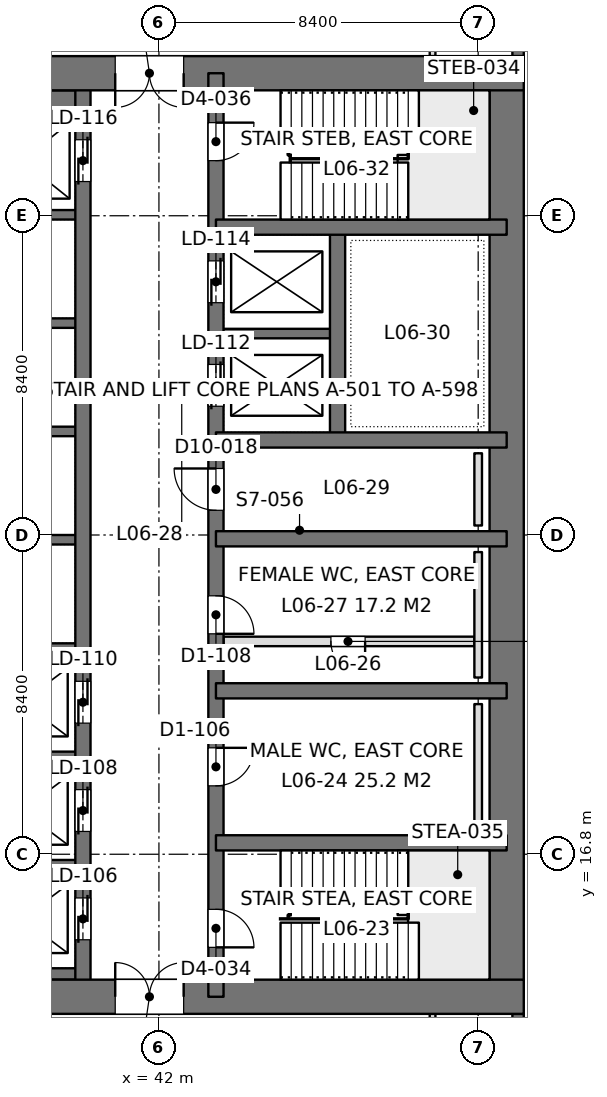
"""IFC4 building model, lengths in metres.
Left out: names, types, materials, properties, quantities, classifications, styles, units other than length and angle.
Written with IfcOpenShell. Run it as: python <this file> out.ifc"""

import sys

from ifc_helpers import new_model, si_unit, direction, frame, frame_2d, origin, place, context, subcontext, project, spatial, rectangle, extrude, element, fill, save


model = new_model("IFC4")
c1 = context("Model", 3, precision=1e-05, world=origin(), true_north=direction((0.0, 1.0)))
c2 = subcontext(c1, "Body", "Model", "MODEL_VIEW")
j1 = project(units=[si_unit("LENGTHUNIT", "METRE"), si_unit("PLANEANGLEUNIT", "RADIAN")], contexts=[c1])
p1 = place(None, origin())
s1 = spatial("IfcSite", under=j1, at=p1, CompositionType="ELEMENT")
p2 = place(p1, origin())
s2 = spatial("IfcBuilding", under=s1, at=p2, CompositionType="ELEMENT")
p3 = place(p2, frame((0.0, 0.0, 27.9)))
s3 = spatial("IfcBuildingStorey", under=s2, at=p3, CompositionType="ELEMENT", Elevation=27.9)
p4 = place(p3, frame((33.6, 13.05, 0.0), z_axis=(0.0, 0.0, 1.0), x_axis=(1.0, 0.0, 0.0)))
e1 = element("IfcWall", 1, at=p4, inside=s3, PredefinedType="SHEAR", context=c2, shape_type="SweptSolid", body=[
    extrude(rectangle(XDim=18.0, YDim=0.9, at=frame_2d((9.0, 0.0))), origin(), (0.0, 0.0, 1.0), 4.5),
])
p5 = place(p4, frame((7.25, 0.0, 0.0)))
e2 = element("IfcOpeningElement", 2, at=p5, cuts=e1, PredefinedType="OPENING", context=c2, shape_type="SweptSolid", body=[
    extrude(rectangle(XDim=1.8, YDim=2.4, at=frame_2d((0.9, 1.2))), frame((0.0, 0.46, 0.0), z_axis=(0.0, -1.0, 0.0), x_axis=(1.0, 0.0, 0.0)), (0.0, 0.0, 1.0), 0.92),
])
p6 = place(p3, frame((33.6, 37.35, 0.0), z_axis=(0.0, 0.0, 1.0), x_axis=(1.0, 0.0, 0.0)))
e3 = element("IfcWall", 3, at=p6, inside=s3, PredefinedType="SHEAR", context=c2, shape_type="SweptSolid", body=[
    extrude(rectangle(XDim=18.0, YDim=0.9, at=frame_2d((9.0, 0.0))), origin(), (0.0, 0.0, 1.0), 4.5),
])
p7 = place(p6, frame((7.25, 0.0, 0.0)))
e4 = element("IfcOpeningElement", 4, at=p7, cuts=e3, PredefinedType="OPENING", context=c2, shape_type="SweptSolid", body=[
    extrude(rectangle(XDim=1.8, YDim=2.4, at=frame_2d((0.9, 1.2))), frame((0.0, 0.46, 0.0), z_axis=(0.0, -1.0, 0.0), x_axis=(1.0, 0.0, 0.0)), (0.0, 0.0, 1.0), 0.92),
])
p8 = place(p3, frame((51.15, 13.05, 0.0), z_axis=(0.0, 0.0, 1.0), x_axis=(0.0, 1.0, 0.0)))
e5 = element("IfcWall", 5, at=p8, inside=s3, PredefinedType="SHEAR", context=c2, shape_type="SweptSolid", body=[
    extrude(rectangle(XDim=24.3, YDim=0.9, at=frame_2d((12.15, 0.0))), origin(), (0.0, 0.0, 1.0), 4.5),
])
p9 = place(p3, frame((43.5, 13.05, 0.0), z_axis=(0.0, 0.0, 1.0), x_axis=(0.0, 1.0, 0.0)))
e6 = element("IfcWall", 6, at=p9, inside=s3, PredefinedType="SHEAR", context=c2, shape_type="SweptSolid", body=[
    extrude(rectangle(XDim=24.3, YDim=0.4, at=frame_2d((12.15, 0.0))), origin(), (0.0, 0.0, 1.0), 4.5),
])
p10 = place(p9, frame((1.3, 0.0, 0.0)))
e7 = element("IfcOpeningElement", 7, at=p10, cuts=e6, PredefinedType="OPENING", context=c2, shape_type="SweptSolid", body=[
    extrude(rectangle(XDim=1.0, YDim=2.2, at=frame_2d((0.5, 1.1))), frame((0.0, 0.21, 0.0), z_axis=(0.0, -1.0, 0.0), x_axis=(1.0, 0.0, 0.0)), (0.0, 0.0, 1.0), 0.42),
])
p11 = place(p9, frame((22.0, 0.0, 0.0)))
e8 = element("IfcOpeningElement", 8, at=p11, cuts=e6, PredefinedType="OPENING", context=c2, shape_type="SweptSolid", body=[
    extrude(rectangle(XDim=1.0, YDim=2.2, at=frame_2d((0.5, 1.1))), frame((0.0, 0.21, 0.0), z_axis=(0.0, -1.0, 0.0), x_axis=(1.0, 0.0, 0.0)), (0.0, 0.0, 1.0), 0.42),
])
p12 = place(p9, frame((5.55, 0.0, 0.0)))
e9 = element("IfcOpeningElement", 9, at=p12, cuts=e6, PredefinedType="OPENING", context=c2, shape_type="SweptSolid", body=[
    extrude(rectangle(XDim=1.0, YDim=2.2, at=frame_2d((0.5, 1.1))), frame((0.0, 0.21, 0.0), z_axis=(0.0, -1.0, 0.0), x_axis=(1.0, 0.0, 0.0)), (0.0, 0.0, 1.0), 0.42),
])
p13 = place(p9, frame((9.55, 0.0, 0.0)))
e10 = element("IfcOpeningElement", 10, at=p13, cuts=e6, PredefinedType="OPENING", context=c2, shape_type="SweptSolid", body=[
    extrude(rectangle(XDim=1.0, YDim=2.2, at=frame_2d((0.5, 1.1))), frame((0.0, 0.21, 0.0), z_axis=(0.0, -1.0, 0.0), x_axis=(1.0, 0.0, 0.0)), (0.0, 0.0, 1.0), 0.42),
])
p14 = place(p9, frame((12.8, 0.0, 0.0)))
e11 = element("IfcOpeningElement", 11, at=p14, cuts=e6, PredefinedType="OPENING", context=c2, shape_type="SweptSolid", body=[
    extrude(rectangle(XDim=1.1, YDim=2.2, at=frame_2d((0.55, 1.1))), frame((0.0, 0.21, 0.0), z_axis=(0.0, -1.0, 0.0), x_axis=(1.0, 0.0, 0.0)), (0.0, 0.0, 1.0), 0.42),
])
p15 = place(p9, frame((15.538, 0.0, 0.0)))
e12 = element("IfcOpeningElement", 12, at=p15, cuts=e6, PredefinedType="OPENING", context=c2, shape_type="SweptSolid", body=[
    extrude(rectangle(XDim=1.1, YDim=2.2, at=frame_2d((0.55, 1.1))), frame((0.0, 0.21, 0.0), z_axis=(0.0, -1.0, 0.0), x_axis=(1.0, 0.0, 0.0)), (0.0, 0.0, 1.0), 0.42),
])
p16 = place(p9, frame((18.262, 0.0, 0.0)))
e13 = element("IfcOpeningElement", 13, at=p16, cuts=e6, PredefinedType="OPENING", context=c2, shape_type="SweptSolid", body=[
    extrude(rectangle(XDim=1.1, YDim=2.2, at=frame_2d((0.55, 1.1))), frame((0.0, 0.21, 0.0), z_axis=(0.0, -1.0, 0.0), x_axis=(1.0, 0.0, 0.0)), (0.0, 0.0, 1.0), 0.42),
])
p17 = place(p3, frame((40.0, 13.05, 0.0), z_axis=(0.0, 0.0, 1.0), x_axis=(0.0, 1.0, 0.0)))
e14 = element("IfcWall", 14, at=p17, inside=s3, PredefinedType="SHEAR", context=c2, shape_type="SweptSolid", body=[
    extrude(rectangle(XDim=24.3, YDim=0.4, at=frame_2d((12.15, 0.0))), origin(), (0.0, 0.0, 1.0), 4.5),
])
p18 = place(p17, frame((1.5, 0.0, 0.0)))
e15 = element("IfcOpeningElement", 15, at=p18, cuts=e14, PredefinedType="OPENING", context=c2, shape_type="SweptSolid", body=[
    extrude(rectangle(XDim=1.1, YDim=2.2, at=frame_2d((0.55, 1.1))), frame((0.0, 0.21, 0.0), z_axis=(0.0, -1.0, 0.0), x_axis=(1.0, 0.0, 0.0)), (0.0, 0.0, 1.0), 0.42),
])
p19 = place(p17, frame((4.35, 0.0, 0.0)))
e16 = element("IfcOpeningElement", 16, at=p19, cuts=e14, PredefinedType="OPENING", context=c2, shape_type="SweptSolid", body=[
    extrude(rectangle(XDim=1.1, YDim=2.2, at=frame_2d((0.55, 1.1))), frame((0.0, 0.21, 0.0), z_axis=(0.0, -1.0, 0.0), x_axis=(1.0, 0.0, 0.0)), (0.0, 0.0, 1.0), 0.42),
])
p20 = place(p17, frame((7.2, 0.0, 0.0)))
e17 = element("IfcOpeningElement", 17, at=p20, cuts=e14, PredefinedType="OPENING", context=c2, shape_type="SweptSolid", body=[
    extrude(rectangle(XDim=1.1, YDim=2.2, at=frame_2d((0.55, 1.1))), frame((0.0, 0.21, 0.0), z_axis=(0.0, -1.0, 0.0), x_axis=(1.0, 0.0, 0.0)), (0.0, 0.0, 1.0), 0.42),
])
p21 = place(p17, frame((21.45, 0.0, 0.0)))
e18 = element("IfcOpeningElement", 18, at=p21, cuts=e14, PredefinedType="OPENING", context=c2, shape_type="SweptSolid", body=[
    extrude(rectangle(XDim=1.1, YDim=2.2, at=frame_2d((0.55, 1.1))), frame((0.0, 0.21, 0.0), z_axis=(0.0, -1.0, 0.0), x_axis=(1.0, 0.0, 0.0)), (0.0, 0.0, 1.0), 0.42),
])
for number, where, z_axis, x_axis in (
    (19, (51.15, 17.1, 0.0), (0.0, 0.0, 1.0), (-1.0, 0.0, 0.0)),
    (20, (51.15, 21.1, 0.0), (0.0, 0.0, 1.0), (-1.0, 0.0, 0.0)),
    (21, (51.15, 25.1, 0.0), (0.0, 0.0, 1.0), (-1.0, 0.0, 0.0)),
    (22, (51.15, 27.7, 0.0), (0.0, 0.0, 1.0), (-1.0, 0.0, 0.0)),
    (23, (51.15, 33.3, 0.0), (0.0, 0.0, 1.0), (-1.0, 0.0, 0.0)),
):
    element("IfcWall", number, at=place(p3, frame(where, z_axis=z_axis, x_axis=x_axis)), inside=s3, PredefinedType="SHEAR", context=c2, shape_type="SweptSolid", body=[
        extrude(rectangle(XDim=7.65, YDim=0.4, at=frame_2d((3.825, 0.0))), origin(), (0.0, 0.0, 1.0), 4.5),
    ])
p22 = place(p3, frame((46.7, 27.7, 0.0), z_axis=(0.0, 0.0, 1.0), x_axis=(0.0, 1.0, 0.0)))
e24 = element("IfcWall", 24, at=p22, inside=s3, PredefinedType="SHEAR", context=c2, shape_type="SweptSolid", body=[
    extrude(rectangle(XDim=5.6, YDim=0.4, at=frame_2d((2.8, 0.0))), origin(), (0.0, 0.0, 1.0), 4.5),
])
p23 = place(p3, frame((46.7, 30.5, 0.0), z_axis=(0.0, 0.0, 1.0), x_axis=(-1.0, 0.0, 0.0)))
e25 = element("IfcWall", 25, at=p23, inside=s3, PredefinedType="SHEAR", context=c2, shape_type="SweptSolid", body=[
    extrude(rectangle(XDim=3.2, YDim=0.25, at=frame_2d((1.6, 0.0))), origin(), (0.0, 0.0, 1.0), 4.5),
])
p24 = place(p3, frame((40.0, 13.65, 0.0), z_axis=(0.0, 0.0, 1.0), x_axis=(-1.0, 0.0, 0.0)))
e26 = element("IfcWall", 26, at=p24, inside=s3, PredefinedType="SHEAR", context=c2, shape_type="SweptSolid", body=[
    extrude(rectangle(XDim=3.2, YDim=0.3, at=frame_2d((1.6, 0.0))), origin(), (0.0, 0.0, 1.0), 4.5),
])
for number, where, z_axis, x_axis in (
    (27, (40.0, 16.525, 0.0), (0.0, 0.0, 1.0), (-1.0, 0.0, 0.0)),
    (28, (40.0, 19.375, 0.0), (0.0, 0.0, 1.0), (-1.0, 0.0, 0.0)),
    (29, (40.0, 22.225, 0.0), (0.0, 0.0, 1.0), (-1.0, 0.0, 0.0)),
    (30, (40.0, 25.075, 0.0), (0.0, 0.0, 1.0), (-1.0, 0.0, 0.0)),
    (31, (40.0, 27.925, 0.0), (0.0, 0.0, 1.0), (-1.0, 0.0, 0.0)),
    (32, (40.0, 30.775, 0.0), (0.0, 0.0, 1.0), (-1.0, 0.0, 0.0)),
    (33, (40.0, 33.625, 0.0), (0.0, 0.0, 1.0), (-1.0, 0.0, 0.0)),
):
    element("IfcWall", number, at=place(p3, frame(where, z_axis=z_axis, x_axis=x_axis)), inside=s3, PredefinedType="SHEAR", context=c2, shape_type="SweptSolid", body=[
        extrude(rectangle(XDim=3.2, YDim=0.25, at=frame_2d((1.6, 0.0))), origin(), (0.0, 0.0, 1.0), 4.5),
    ])
p25 = place(p3, frame((40.0, 36.625, 0.0), z_axis=(0.0, 0.0, 1.0), x_axis=(-1.0, 0.0, 0.0)))
e34 = element("IfcWall", 34, at=p25, inside=s3, PredefinedType="SHEAR", context=c2, shape_type="SweptSolid", body=[
    extrude(rectangle(XDim=3.2, YDim=0.55, at=frame_2d((1.6, 0.0))), origin(), (0.0, 0.0, 1.0), 4.5),
])
p26 = place(p3, frame((51.45, 42.0, 0.0), z_axis=(0.0, 0.0, 1.0), x_axis=(0.0, -1.0, 0.0)))
e35 = element("IfcWall", 35, at=p26, inside=s3, PredefinedType="SOLIDWALL", context=c2, shape_type="SweptSolid", body=[
    extrude(rectangle(XDim=4.2, YDim=0.3, at=frame_2d((2.1, 0.0))), origin(), (0.0, 0.0, 1.0), 4.34),
])
p27 = place(p26, frame((0.9, 0.0, 0.9)))
e36 = element("IfcOpeningElement", 36, at=p27, cuts=e35, PredefinedType="OPENING", context=c2, shape_type="SweptSolid", body=[
    extrude(rectangle(XDim=2.4, YDim=1.9, at=frame_2d((1.2, 0.95))), frame((0.0, 0.16, 0.0), z_axis=(0.0, -1.0, 0.0), x_axis=(1.0, 0.0, 0.0)), (0.0, 0.0, 1.0), 0.32),
])
p28 = place(p3, frame((51.45, 12.6, 0.0), z_axis=(0.0, 0.0, 1.0), x_axis=(0.0, -1.0, 0.0)))
e37 = element("IfcWall", 37, at=p28, inside=s3, PredefinedType="SOLIDWALL", context=c2, shape_type="SweptSolid", body=[
    extrude(rectangle(XDim=4.2, YDim=0.3, at=frame_2d((2.1, 0.0))), origin(), (0.0, 0.0, 1.0), 4.34),
])
p29 = place(p28, frame((0.9, 0.0, 0.9)))
e38 = element("IfcOpeningElement", 38, at=p29, cuts=e37, PredefinedType="OPENING", context=c2, shape_type="SweptSolid", body=[
    extrude(rectangle(XDim=2.4, YDim=1.9, at=frame_2d((1.2, 0.95))), frame((0.0, 0.16, 0.0), z_axis=(0.0, -1.0, 0.0), x_axis=(1.0, 0.0, 0.0)), (0.0, 0.0, 1.0), 0.32),
])
p30 = place(p3, frame((49.2, 10.8, 0.0), z_axis=(0.0, 0.0, 1.0), x_axis=(0.0, 1.0, 0.0)))
e39 = element("IfcWall", 39, at=p30, inside=s3, PredefinedType="PARTITIONING", context=c2, shape_type="SweptSolid", body=[
    extrude(rectangle(XDim=1.802, YDim=0.15, at=frame_2d((0.901, 0.0))), origin(), (0.0, 0.0, 1.0), 4.34),
])
p31 = place(p3, frame((49.2, 37.8, 0.0), z_axis=(0.0, 0.0, 1.0), x_axis=(0.0, 1.0, 0.0)))
e40 = element("IfcWall", 40, at=p31, inside=s3, PredefinedType="PARTITIONING", context=c2, shape_type="SweptSolid", body=[
    extrude(rectangle(XDim=1.8, YDim=0.15, at=frame_2d((0.9, 0.0))), origin(), (0.0, 0.0, 1.0), 4.34),
])
p32 = place(p3, frame((43.7, 22.4, 0.0), z_axis=(0.0, 0.0, 1.0), x_axis=(1.0, 0.0, 0.0)))
e41 = element("IfcWall", 41, at=p32, inside=s3, PredefinedType="PARTITIONING", context=c2, shape_type="SweptSolid", body=[
    extrude(rectangle(XDim=6.6, YDim=0.25, at=frame_2d((3.3, 0.0))), origin(), (0.0, 0.0, 1.0), 4.3),
])
p33 = place(p32, frame((2.825, 0.0, 0.0)))
e42 = element("IfcOpeningElement", 42, at=p33, cuts=e41, PredefinedType="OPENING", context=c2, shape_type="SweptSolid", body=[
    extrude(rectangle(XDim=0.9, YDim=2.2, at=frame_2d((0.45, 1.1))), frame((0.0, 0.135, 0.0), z_axis=(0.0, -1.0, 0.0), x_axis=(1.0, 0.0, 0.0)), (0.0, 0.0, 1.0), 0.27),
])
for number, where, z_axis, x_axis in (
    (43, (50.4, 17.45, 0.0), (0.0, 0.0, 1.0), (0.0, 1.0, 0.0)),
    (44, (50.4, 21.45, 0.0), (0.0, 0.0, 1.0), (0.0, 1.0, 0.0)),
):
    element("IfcWall", number, at=place(p3, frame(where, z_axis=z_axis, x_axis=x_axis)), inside=s3, PredefinedType="PLUMBINGWALL", context=c2, shape_type="SweptSolid", body=[
        extrude(rectangle(XDim=3.3, YDim=0.2, at=frame_2d((1.65, 0.0))), origin(), (0.0, 0.0, 1.0), 1.2),
    ])
p34 = place(p3, frame((50.4, 25.45, 0.0), z_axis=(0.0, 0.0, 1.0), x_axis=(0.0, 1.0, 0.0)))
e45 = element("IfcWall", 45, at=p34, inside=s3, PredefinedType="PLUMBINGWALL", context=c2, shape_type="SweptSolid", body=[
    extrude(rectangle(XDim=1.9, YDim=0.2, at=frame_2d((0.95, 0.0))), origin(), (0.0, 0.0, 1.0), 1.2),
])
p35 = place(p5, origin())
e46 = element("IfcDoor", 46, at=p35, inside=s3, OperationType="DOUBLE_DOOR_SINGLE_SWING", PredefinedType="DOOR", context=c2, shape_type="SweptSolid", body=[
    extrude(rectangle(XDim=1.8, YDim=2.4, at=frame_2d((0.9, 1.2))), frame((0.0, 0.025, 0.0), z_axis=(0.0, -1.0, 0.0), x_axis=(1.0, 0.0, 0.0)), (0.0, 0.0, 1.0), 0.05),
])
fill(e2, e46)
p36 = place(p7, frame((1.8, 0.0, 0.0), z_axis=(0.0, 0.0, 1.0), x_axis=(-1.0, 0.0, 0.0)))
e47 = element("IfcDoor", 47, at=p36, inside=s3, OperationType="DOUBLE_DOOR_SINGLE_SWING", PredefinedType="DOOR", context=c2, shape_type="SweptSolid", body=[
    extrude(rectangle(XDim=1.8, YDim=2.4, at=frame_2d((0.9, 1.2))), frame((0.0, 0.025, 0.0), z_axis=(0.0, -1.0, 0.0), x_axis=(1.0, 0.0, 0.0)), (0.0, 0.0, 1.0), 0.05),
])
fill(e4, e47)
p37 = place(p10, frame((1.0, 0.0, 0.0), z_axis=(0.0, 0.0, 1.0), x_axis=(-1.0, 0.0, 0.0)))
e48 = element("IfcDoor", 48, at=p37, inside=s3, OperationType="SINGLE_SWING_RIGHT", PredefinedType="DOOR", context=c2, shape_type="SweptSolid", body=[
    extrude(rectangle(XDim=1.0, YDim=2.2, at=frame_2d((0.5, 1.1))), frame((0.0, 0.025, 0.0), z_axis=(0.0, -1.0, 0.0), x_axis=(1.0, 0.0, 0.0)), (0.0, 0.0, 1.0), 0.05),
])
fill(e7, e48)
p38 = place(p11, frame((1.0, 0.0, 0.0), z_axis=(0.0, 0.0, 1.0), x_axis=(-1.0, 0.0, 0.0)))
e49 = element("IfcDoor", 49, at=p38, inside=s3, OperationType="SINGLE_SWING_LEFT", PredefinedType="DOOR", context=c2, shape_type="SweptSolid", body=[
    extrude(rectangle(XDim=1.0, YDim=2.2, at=frame_2d((0.5, 1.1))), frame((0.0, 0.025, 0.0), z_axis=(0.0, -1.0, 0.0), x_axis=(1.0, 0.0, 0.0)), (0.0, 0.0, 1.0), 0.05),
])
fill(e8, e49)
p39 = place(p12, frame((1.0, 0.0, 0.0), z_axis=(0.0, 0.0, 1.0), x_axis=(-1.0, 0.0, 0.0)))
e50 = element("IfcDoor", 50, at=p39, inside=s3, OperationType="SINGLE_SWING_LEFT", PredefinedType="DOOR", context=c2, shape_type="SweptSolid", body=[
    extrude(rectangle(XDim=1.0, YDim=2.2, at=frame_2d((0.5, 1.1))), frame((0.0, 0.025, 0.0), z_axis=(0.0, -1.0, 0.0), x_axis=(1.0, 0.0, 0.0)), (0.0, 0.0, 1.0), 0.05),
])
fill(e9, e50)
p40 = place(p13, frame((1.0, 0.0, 0.0), z_axis=(0.0, 0.0, 1.0), x_axis=(-1.0, 0.0, 0.0)))
e51 = element("IfcDoor", 51, at=p40, inside=s3, OperationType="SINGLE_SWING_RIGHT", PredefinedType="DOOR", context=c2, shape_type="SweptSolid", body=[
    extrude(rectangle(XDim=1.0, YDim=2.2, at=frame_2d((0.5, 1.1))), frame((0.0, 0.025, 0.0), z_axis=(0.0, -1.0, 0.0), x_axis=(1.0, 0.0, 0.0)), (0.0, 0.0, 1.0), 0.05),
])
fill(e10, e51)
p41 = place(p14, origin())
e52 = element("IfcDoor", 52, at=p41, inside=s3, OperationType="SINGLE_SWING_RIGHT", PredefinedType="DOOR", context=c2, shape_type="SweptSolid", body=[
    extrude(rectangle(XDim=1.1, YDim=2.2, at=frame_2d((0.55, 1.1))), frame((0.0, 0.025, 0.0), z_axis=(0.0, -1.0, 0.0), x_axis=(1.0, 0.0, 0.0)), (0.0, 0.0, 1.0), 0.05),
])
fill(e11, e52)
p42 = place(p18, origin())
e53 = element("IfcDoor", 53, at=p42, inside=s3, OperationType="DOUBLE_DOOR_SLIDING", PredefinedType="DOOR", context=c2, shape_type="SweptSolid", body=[
    extrude(rectangle(XDim=1.1, YDim=2.2, at=frame_2d((0.55, 1.1))), frame((0.0, 0.025, 0.0), z_axis=(0.0, -1.0, 0.0), x_axis=(1.0, 0.0, 0.0)), (0.0, 0.0, 1.0), 0.05),
])
fill(e15, e53)
p43 = place(p19, origin())
e54 = element("IfcDoor", 54, at=p43, inside=s3, OperationType="DOUBLE_DOOR_SLIDING", PredefinedType="DOOR", context=c2, shape_type="SweptSolid", body=[
    extrude(rectangle(XDim=1.1, YDim=2.2, at=frame_2d((0.55, 1.1))), frame((0.0, 0.025, 0.0), z_axis=(0.0, -1.0, 0.0), x_axis=(1.0, 0.0, 0.0)), (0.0, 0.0, 1.0), 0.05),
])
fill(e16, e54)
p44 = place(p20, origin())
e55 = element("IfcDoor", 55, at=p44, inside=s3, OperationType="DOUBLE_DOOR_SLIDING", PredefinedType="DOOR", context=c2, shape_type="SweptSolid", body=[
    extrude(rectangle(XDim=1.1, YDim=2.2, at=frame_2d((0.55, 1.1))), frame((0.0, 0.025, 0.0), z_axis=(0.0, -1.0, 0.0), x_axis=(1.0, 0.0, 0.0)), (0.0, 0.0, 1.0), 0.05),
])
fill(e17, e55)
p45 = place(p21, origin())
e56 = element("IfcDoor", 56, at=p45, inside=s3, OperationType="DOUBLE_DOOR_SLIDING", PredefinedType="DOOR", context=c2, shape_type="SweptSolid", body=[
    extrude(rectangle(XDim=1.1, YDim=2.2, at=frame_2d((0.55, 1.1))), frame((0.0, 0.025, 0.0), z_axis=(0.0, -1.0, 0.0), x_axis=(1.0, 0.0, 0.0)), (0.0, 0.0, 1.0), 0.05),
])
fill(e18, e56)
p46 = place(p15, origin())
e57 = element("IfcDoor", 57, at=p46, inside=s3, OperationType="DOUBLE_DOOR_SLIDING", PredefinedType="DOOR", context=c2, shape_type="SweptSolid", body=[
    extrude(rectangle(XDim=1.1, YDim=2.2, at=frame_2d((0.55, 1.1))), frame((0.0, 0.025, 0.0), z_axis=(0.0, -1.0, 0.0), x_axis=(1.0, 0.0, 0.0)), (0.0, 0.0, 1.0), 0.05),
])
fill(e12, e57)
p47 = place(p16, origin())
e58 = element("IfcDoor", 58, at=p47, inside=s3, OperationType="DOUBLE_DOOR_SLIDING", PredefinedType="DOOR", context=c2, shape_type="SweptSolid", body=[
    extrude(rectangle(XDim=1.1, YDim=2.2, at=frame_2d((0.55, 1.1))), frame((0.0, 0.025, 0.0), z_axis=(0.0, -1.0, 0.0), x_axis=(1.0, 0.0, 0.0)), (0.0, 0.0, 1.0), 0.05),
])
fill(e13, e58)
p48 = place(p33, frame((0.9, 0.0, 0.0), z_axis=(0.0, 0.0, 1.0), x_axis=(-1.0, 0.0, 0.0)))
e59 = element("IfcDoor", 59, at=p48, inside=s3, OperationType="SINGLE_SWING_LEFT", PredefinedType="DOOR", context=c2, shape_type="SweptSolid", body=[
    extrude(rectangle(XDim=0.9, YDim=2.2, at=frame_2d((0.45, 1.1))), frame((0.0, 0.025, 0.0), z_axis=(0.0, -1.0, 0.0), x_axis=(1.0, 0.0, 0.0)), (0.0, 0.0, 1.0), 0.05),
])
fill(e42, e59)
save(model, sys.argv[1])
